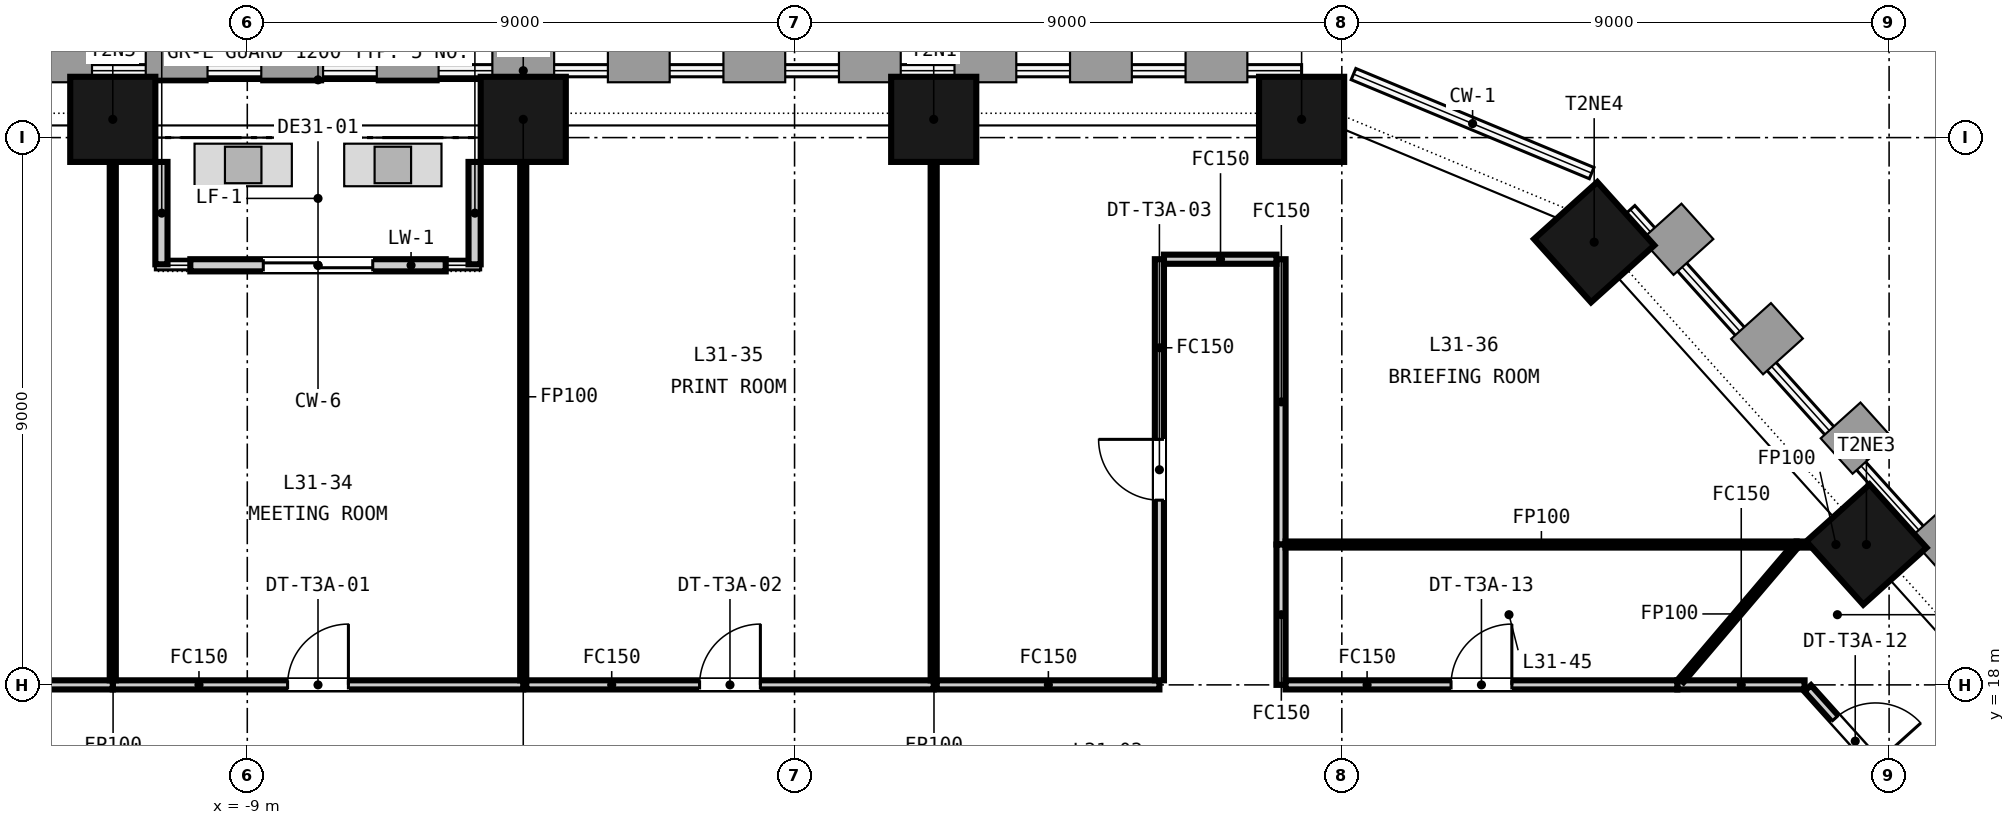
"""IFC4 building model, lengths in metres.
Left out: names, types, materials, properties, quantities, classifications, styles, units other than length and angle.
Written with IfcOpenShell. Run it as: python <this file> out.ifc"""

import sys

from ifc_helpers import new_model, si_unit, direction, frame, frame_2d, origin, origin_2d, place, context, subcontext, project, spatial, rectangle, extrude, element, fill, save


model = new_model("IFC4")
c1 = context("Model", 3, precision=1e-05, world=origin(), true_north=direction((0.0, 1.0)))
c2 = subcontext(c1, "Body", "Model", "MODEL_VIEW")
j1 = project(units=[si_unit("LENGTHUNIT", "METRE"), si_unit("PLANEANGLEUNIT", "RADIAN")], contexts=[c1])
p1 = place(None, origin())
s1 = spatial("IfcSite", under=j1, at=p1, CompositionType="ELEMENT")
p2 = place(p1, origin())
s2 = spatial("IfcBuilding", under=s1, at=p2, CompositionType="ELEMENT")
p3 = place(p2, frame((0.0, 0.0, 129.8)))
s3 = spatial("IfcBuildingStorey", under=s2, at=p3, CompositionType="ELEMENT", Elevation=129.8)
for number, where, z_axis, x_axis in (
    (1, (8.339, 27.3, -0.15), (0.0, 0.0, 1.0), (-1.0, 0.0, 0.0)),
    (2, (2.288, 27.3, -0.15), (0.0, 0.0, 1.0), (-1.0, 0.0, 0.0)),
    (3, (-4.462, 27.3, -0.15), (0.0, 0.0, 1.0), (-1.0, 0.0, 0.0)),
    (4, (-11.212, 27.3, -0.15), (0.0, 0.0, 1.0), (-1.0, 0.0, 0.0)),
    (5, (17.627, 20.308, -0.15), (0.0, 0.0, 1.0), (-0.669, 0.743, 0.0)),
    (6, (13.15, 25.28, -0.15), (0.0, 0.0, 1.0), (-0.669, 0.743, 0.0)),
):
    element("IfcColumn", number, at=place(p3, frame(where, z_axis=z_axis, x_axis=x_axis)), inside=s3, PredefinedType="COLUMN", context=c2, shape_type="SweptSolid", body=[
        extrude(rectangle(XDim=1.4, YDim=1.4, at=origin_2d()), origin(), (0.0, 0.0, 1.0), 3.65),
    ])
p4 = place(p3, frame((-5.737, 24.9, 0.0), z_axis=(0.0, 0.0, 1.0), x_axis=(-1.0, 0.0, 0.0)))
e7 = element("IfcWall", 7, at=p4, inside=s3, PredefinedType="SOLIDWALL", context=c2, shape_type="SweptSolid", body=[
    extrude(rectangle(XDim=4.2, YDim=0.2, at=frame_2d((2.1, 0.0))), origin(), (0.0, 0.0, 1.0), 2.751),
])
p5 = place(p4, frame((1.2, 0.0, 0.0)))
e8 = element("IfcOpeningElement", 8, at=p5, cuts=e7, PredefinedType="OPENING", context=c2, shape_type="SweptSolid", body=[
    extrude(rectangle(XDim=1.8, YDim=2.4, at=frame_2d((0.9, 1.2))), frame((0.0, 0.11, 0.0), z_axis=(0.0, -1.0, 0.0), x_axis=(1.0, 0.0, 0.0)), (0.0, 0.0, 1.0), 0.22),
])
for number, where, z_axis, x_axis in (
    (9, (-5.262, 26.6, 0.0), (0.0, 0.0, 1.0), (0.0, -1.0, 0.0)),
    (10, (-10.412, 26.6, 0.0), (0.0, 0.0, 1.0), (0.0, -1.0, 0.0)),
):
    element("IfcWall", number, at=place(p3, frame(where, z_axis=z_axis, x_axis=x_axis)), inside=s3, PredefinedType="SOLIDWALL", context=c2, shape_type="SweptSolid", body=[
        extrude(rectangle(XDim=1.684, YDim=0.2, at=frame_2d((0.842, 0.0))), origin(), (0.0, 0.0, 1.0), 3.05),
    ])
p6 = place(p3, frame((8.0, 25.0, 0.0), z_axis=(0.0, 0.0, 1.0), x_axis=(0.0, -1.0, 0.0)))
e11 = element("IfcWall", 11, at=p6, inside=s3, PredefinedType="PARTITIONING", context=c2, shape_type="SweptSolid", body=[
    extrude(rectangle(XDim=4.692, YDim=0.15, at=frame_2d((2.346, 0.0))), origin(), (0.0, 0.0, 1.0), 2.741),
])
p7 = place(p3, frame((8.0, 20.308, 0.0), z_axis=(0.0, 0.0, 1.0), x_axis=(0.0, -1.0, 0.0)))
e12 = element("IfcWall", 12, at=p7, inside=s3, PredefinedType="PARTITIONING", context=c2, shape_type="SweptSolid", body=[
    extrude(rectangle(XDim=2.308, YDim=0.15, at=frame_2d((1.154, 0.0))), origin(), (0.0, 0.0, 1.0), 2.741),
])
p8 = place(p3, frame((-11.212, 18.0, 0.0), z_axis=(0.0, 0.0, 1.0), x_axis=(1.0, 0.0, 0.0)))
e13 = element("IfcWall", 13, at=p8, inside=s3, PredefinedType="PARTITIONING", context=c2, shape_type="SweptSolid", body=[
    extrude(rectangle(XDim=6.75, YDim=0.15, at=frame_2d((3.375, 0.0))), origin(), (0.0, 0.0, 1.0), 2.741),
])
p9 = place(p8, frame((2.875, 0.0, 0.0)))
e14 = element("IfcOpeningElement", 14, at=p9, cuts=e13, PredefinedType="OPENING", context=c2, shape_type="SweptSolid", body=[
    extrude(rectangle(XDim=1.0, YDim=2.1, at=frame_2d((0.5, 1.05))), frame((0.0, 0.085, 0.0), z_axis=(0.0, -1.0, 0.0), x_axis=(1.0, 0.0, 0.0)), (0.0, 0.0, 1.0), 0.17),
])
p10 = place(p3, frame((-4.462, 18.075, 0.0), z_axis=(0.0, 0.0, 1.0), x_axis=(0.0, 1.0, 0.0)))
e15 = element("IfcWall", 15, at=p10, inside=s3, PredefinedType="PARTITIONING", context=c2, shape_type="SweptSolid", body=[
    extrude(rectangle(XDim=9.325, YDim=0.1, at=frame_2d((4.663, 0.0))), origin(), (0.0, 0.0, 1.0), 2.741),
])
p11 = place(p3, frame((-4.412, 18.0, 0.0), z_axis=(0.0, 0.0, 1.0), x_axis=(1.0, 0.0, 0.0)))
e16 = element("IfcWall", 16, at=p11, inside=s3, PredefinedType="PARTITIONING", context=c2, shape_type="SweptSolid", body=[
    extrude(rectangle(XDim=6.7, YDim=0.15, at=frame_2d((3.35, 0.0))), origin(), (0.0, 0.0, 1.0), 2.741),
])
p12 = place(p11, frame((2.85, 0.0, 0.0)))
e17 = element("IfcOpeningElement", 17, at=p12, cuts=e16, PredefinedType="OPENING", context=c2, shape_type="SweptSolid", body=[
    extrude(rectangle(XDim=1.0, YDim=2.1, at=frame_2d((0.5, 1.05))), frame((0.0, 0.085, 0.0), z_axis=(0.0, -1.0, 0.0), x_axis=(1.0, 0.0, 0.0)), (0.0, 0.0, 1.0), 0.17),
])
p13 = place(p3, frame((2.288, 18.075, 0.0), z_axis=(0.0, 0.0, 1.0), x_axis=(0.0, 1.0, 0.0)))
e18 = element("IfcWall", 18, at=p13, inside=s3, PredefinedType="PARTITIONING", context=c2, shape_type="SweptSolid", body=[
    extrude(rectangle(XDim=9.325, YDim=0.1, at=frame_2d((4.663, 0.0))), origin(), (0.0, 0.0, 1.0), 2.741),
])
p14 = place(p3, frame((2.338, 18.0, 0.0), z_axis=(0.0, 0.0, 1.0), x_axis=(1.0, 0.0, 0.0)))
e19 = element("IfcWall", 19, at=p14, inside=s3, PredefinedType="PARTITIONING", context=c2, shape_type="SweptSolid", body=[
    extrude(rectangle(XDim=3.662, YDim=0.15, at=frame_2d((1.831, 0.0))), origin(), (0.0, 0.0, 1.0), 2.741),
])
p15 = place(p3, frame((6.0, 18.075, 0.0), z_axis=(0.0, 0.0, 1.0), x_axis=(0.0, 1.0, 0.0)))
e20 = element("IfcWall", 20, at=p15, inside=s3, PredefinedType="PARTITIONING", context=c2, shape_type="SweptSolid", body=[
    extrude(rectangle(XDim=6.925, YDim=0.15, at=frame_2d((3.462, 0.0))), origin(), (0.0, 0.0, 1.0), 2.741),
])
p16 = place(p15, frame((2.962, 0.0, 0.0)))
e21 = element("IfcOpeningElement", 21, at=p16, cuts=e20, PredefinedType="OPENING", context=c2, shape_type="SweptSolid", body=[
    extrude(rectangle(XDim=1.0, YDim=2.1, at=frame_2d((0.5, 1.05))), frame((0.0, 0.085, 0.0), z_axis=(0.0, -1.0, 0.0), x_axis=(1.0, 0.0, 0.0)), (0.0, 0.0, 1.0), 0.17),
])
p17 = place(p3, frame((6.075, 25.0, 0.0), z_axis=(0.0, 0.0, 1.0), x_axis=(1.0, 0.0, 0.0)))
e22 = element("IfcWall", 22, at=p17, inside=s3, PredefinedType="PARTITIONING", context=c2, shape_type="SweptSolid", body=[
    extrude(rectangle(XDim=1.85, YDim=0.15, at=frame_2d((0.925, 0.0))), origin(), (0.0, 0.0, 1.0), 2.741),
])
p18 = place(p3, frame((16.479, 20.308, 0.0), z_axis=(0.0, 0.0, 1.0), x_axis=(1.0, 0.0, 0.0)))
e23 = element("IfcWall", 23, at=p18, inside=s3, PredefinedType="PARTITIONING", context=c2, shape_type="SweptSolid", body=[
    extrude(rectangle(XDim=1.283, YDim=0.1, at=frame_2d((0.642, 0.0))), origin(), (0.0, 0.0, 1.0), 2.741),
])
p19 = place(p3, frame((8.075, 20.308, 0.0), z_axis=(0.0, 0.0, 1.0), x_axis=(1.0, 0.0, 0.0)))
e24 = element("IfcWall", 24, at=p19, inside=s3, PredefinedType="PARTITIONING", context=c2, shape_type="SweptSolid", body=[
    extrude(rectangle(XDim=8.404, YDim=0.1, at=frame_2d((4.202, 0.0))), origin(), (0.0, 0.0, 1.0), 2.741),
])
p20 = place(p3, frame((-17.449, 18.0, 0.0), z_axis=(0.0, 0.0, 1.0), x_axis=(1.0, 0.0, 0.0)))
e25 = element("IfcWall", 25, at=p20, inside=s3, PredefinedType="PARTITIONING", context=c2, shape_type="SweptSolid", body=[
    extrude(rectangle(XDim=6.237, YDim=0.15, at=frame_2d((3.119, 0.0))), origin(), (0.0, 0.0, 1.0), 2.741),
])
p21 = place(p3, frame((-11.212, 18.075, 0.0), z_axis=(0.0, 0.0, 1.0), x_axis=(0.0, 1.0, 0.0)))
e26 = element("IfcWall", 26, at=p21, inside=s3, PredefinedType="PARTITIONING", context=c2, shape_type="SweptSolid", body=[
    extrude(rectangle(XDim=9.325, YDim=0.1, at=frame_2d((4.663, 0.0))), origin(), (0.0, 0.0, 1.0), 2.741),
])
p22 = place(p3, frame((14.517, 18.0, 0.0), z_axis=(0.0, 0.0, 1.0), x_axis=(1.0, 0.0, 0.0)))
e27 = element("IfcWall", 27, at=p22, inside=s3, PredefinedType="PARTITIONING", context=c2, shape_type="SweptSolid", body=[
    extrude(rectangle(XDim=2.093, YDim=0.15, at=frame_2d((1.046, 0.0))), origin(), (0.0, 0.0, 1.0), 2.741),
])
p23 = place(p3, frame((16.66, 17.944, 0.0), z_axis=(0.0, 0.0, 1.0), x_axis=(0.669103043777, -0.743169642012, 0.0)))
e28 = element("IfcWall", 28, at=p23, inside=s3, PredefinedType="PARTITIONING", context=c2, shape_type="SweptSolid", body=[
    extrude(rectangle(XDim=2.34, YDim=0.15, at=frame_2d((1.17, 0.0))), origin(), (0.0, 0.0, 1.0), 2.741),
])
p24 = place(p23, frame((0.67, 0.0, 0.0)))
e29 = element("IfcOpeningElement", 29, at=p24, cuts=e28, PredefinedType="OPENING", context=c2, shape_type="SweptSolid", body=[
    extrude(rectangle(XDim=1.0, YDim=2.1, at=frame_2d((0.5, 1.05))), frame((0.0, 0.085, 0.0), z_axis=(0.0, -1.0, 0.0), x_axis=(1.0, 0.0, 0.0)), (0.0, 0.0, 1.0), 0.17),
])
p25 = place(p3, frame((18.455, 15.825, 0.0), z_axis=(0.0, 0.0, 1.0), x_axis=(0.647780060511, 0.761827403815, 0.0)))
e30 = element("IfcWall", 30, at=p25, inside=s3, PredefinedType="PARTITIONING", context=c2, shape_type="SweptSolid", body=[
    extrude(rectangle(XDim=2.207, YDim=0.1, at=frame_2d((1.104, 0.0))), origin(), (0.0, 0.0, 1.0), 2.741),
])
p26 = place(p3, frame((8.075, 18.0, 0.0), z_axis=(0.0, 0.0, 1.0), x_axis=(1.0, 0.0, 0.0)))
e31 = element("IfcWall", 31, at=p26, inside=s3, PredefinedType="PARTITIONING", context=c2, shape_type="SweptSolid", body=[
    extrude(rectangle(XDim=6.442, YDim=0.15, at=frame_2d((3.221, 0.0))), origin(), (0.0, 0.0, 1.0), 2.741),
])
p27 = place(p26, frame((2.721, 0.0, 0.0)))
e32 = element("IfcOpeningElement", 32, at=p27, cuts=e31, PredefinedType="OPENING", context=c2, shape_type="SweptSolid", body=[
    extrude(rectangle(XDim=1.0, YDim=2.1, at=frame_2d((0.5, 1.05))), frame((0.0, 0.085, 0.0), z_axis=(0.0, -1.0, 0.0), x_axis=(1.0, 0.0, 0.0)), (0.0, 0.0, 1.0), 0.17),
])
p28 = place(p3, frame((14.581, 18.075, 0.0), z_axis=(0.0, 0.0, 1.0), x_axis=(0.6476632602, 0.761926703422, 0.0)))
e33 = element("IfcWall", 33, at=p28, inside=s3, PredefinedType="PARTITIONING", context=c2, shape_type="SweptSolid", body=[
    extrude(rectangle(XDim=2.865, YDim=0.1, at=frame_2d((1.433, 0.0))), origin(), (0.0, 0.0, 1.0), 2.741),
])
p29 = place(p5, origin())
e34 = element("IfcDoor", 34, at=p29, inside=s3, OperationType="SINGLE_SWING_LEFT", PredefinedType="DOOR", context=c2, shape_type="SweptSolid", body=[
    extrude(rectangle(XDim=1.8, YDim=2.4, at=frame_2d((0.9, 1.2))), frame((0.0, 0.025, 0.0), z_axis=(0.0, -1.0, 0.0), x_axis=(1.0, 0.0, 0.0)), (0.0, 0.0, 1.0), 0.05),
])
fill(e8, e34)
p30 = place(p9, origin())
e35 = element("IfcDoor", 35, at=p30, inside=s3, OperationType="SINGLE_SWING_RIGHT", PredefinedType="DOOR", context=c2, shape_type="SweptSolid", body=[
    extrude(rectangle(XDim=1.0, YDim=2.1, at=frame_2d((0.5, 1.05))), frame((0.0, 0.025, 0.0), z_axis=(0.0, -1.0, 0.0), x_axis=(1.0, 0.0, 0.0)), (0.0, 0.0, 1.0), 0.05),
])
fill(e14, e35)
p31 = place(p12, origin())
e36 = element("IfcDoor", 36, at=p31, inside=s3, OperationType="SINGLE_SWING_RIGHT", PredefinedType="DOOR", context=c2, shape_type="SweptSolid", body=[
    extrude(rectangle(XDim=1.0, YDim=2.1, at=frame_2d((0.5, 1.05))), frame((0.0, 0.025, 0.0), z_axis=(0.0, -1.0, 0.0), x_axis=(1.0, 0.0, 0.0)), (0.0, 0.0, 1.0), 0.05),
])
fill(e17, e36)
p32 = place(p16, origin())
e37 = element("IfcDoor", 37, at=p32, inside=s3, OperationType="SINGLE_SWING_RIGHT", PredefinedType="DOOR", context=c2, shape_type="SweptSolid", body=[
    extrude(rectangle(XDim=1.0, YDim=2.1, at=frame_2d((0.5, 1.05))), frame((0.0, 0.025, 0.0), z_axis=(0.0, -1.0, 0.0), x_axis=(1.0, 0.0, 0.0)), (0.0, 0.0, 1.0), 0.05),
])
fill(e21, e37)
p33 = place(p24, origin())
e38 = element("IfcDoor", 38, at=p33, inside=s3, OperationType="SINGLE_SWING_RIGHT", PredefinedType="DOOR", context=c2, shape_type="SweptSolid", body=[
    extrude(rectangle(XDim=1.0, YDim=2.1, at=frame_2d((0.5, 1.05))), frame((0.0, 0.025, 0.0), z_axis=(0.0, -1.0, 0.0), x_axis=(1.0, 0.0, 0.0)), (0.0, 0.0, 1.0), 0.05),
])
fill(e29, e38)
p34 = place(p27, origin())
e39 = element("IfcDoor", 39, at=p34, inside=s3, OperationType="SINGLE_SWING_RIGHT", PredefinedType="DOOR", context=c2, shape_type="SweptSolid", body=[
    extrude(rectangle(XDim=1.0, YDim=2.1, at=frame_2d((0.5, 1.05))), frame((0.0, 0.025, 0.0), z_axis=(0.0, -1.0, 0.0), x_axis=(1.0, 0.0, 0.0)), (0.0, 0.0, 1.0), 0.05),
])
fill(e32, e39)
save(model, sys.argv[1])
